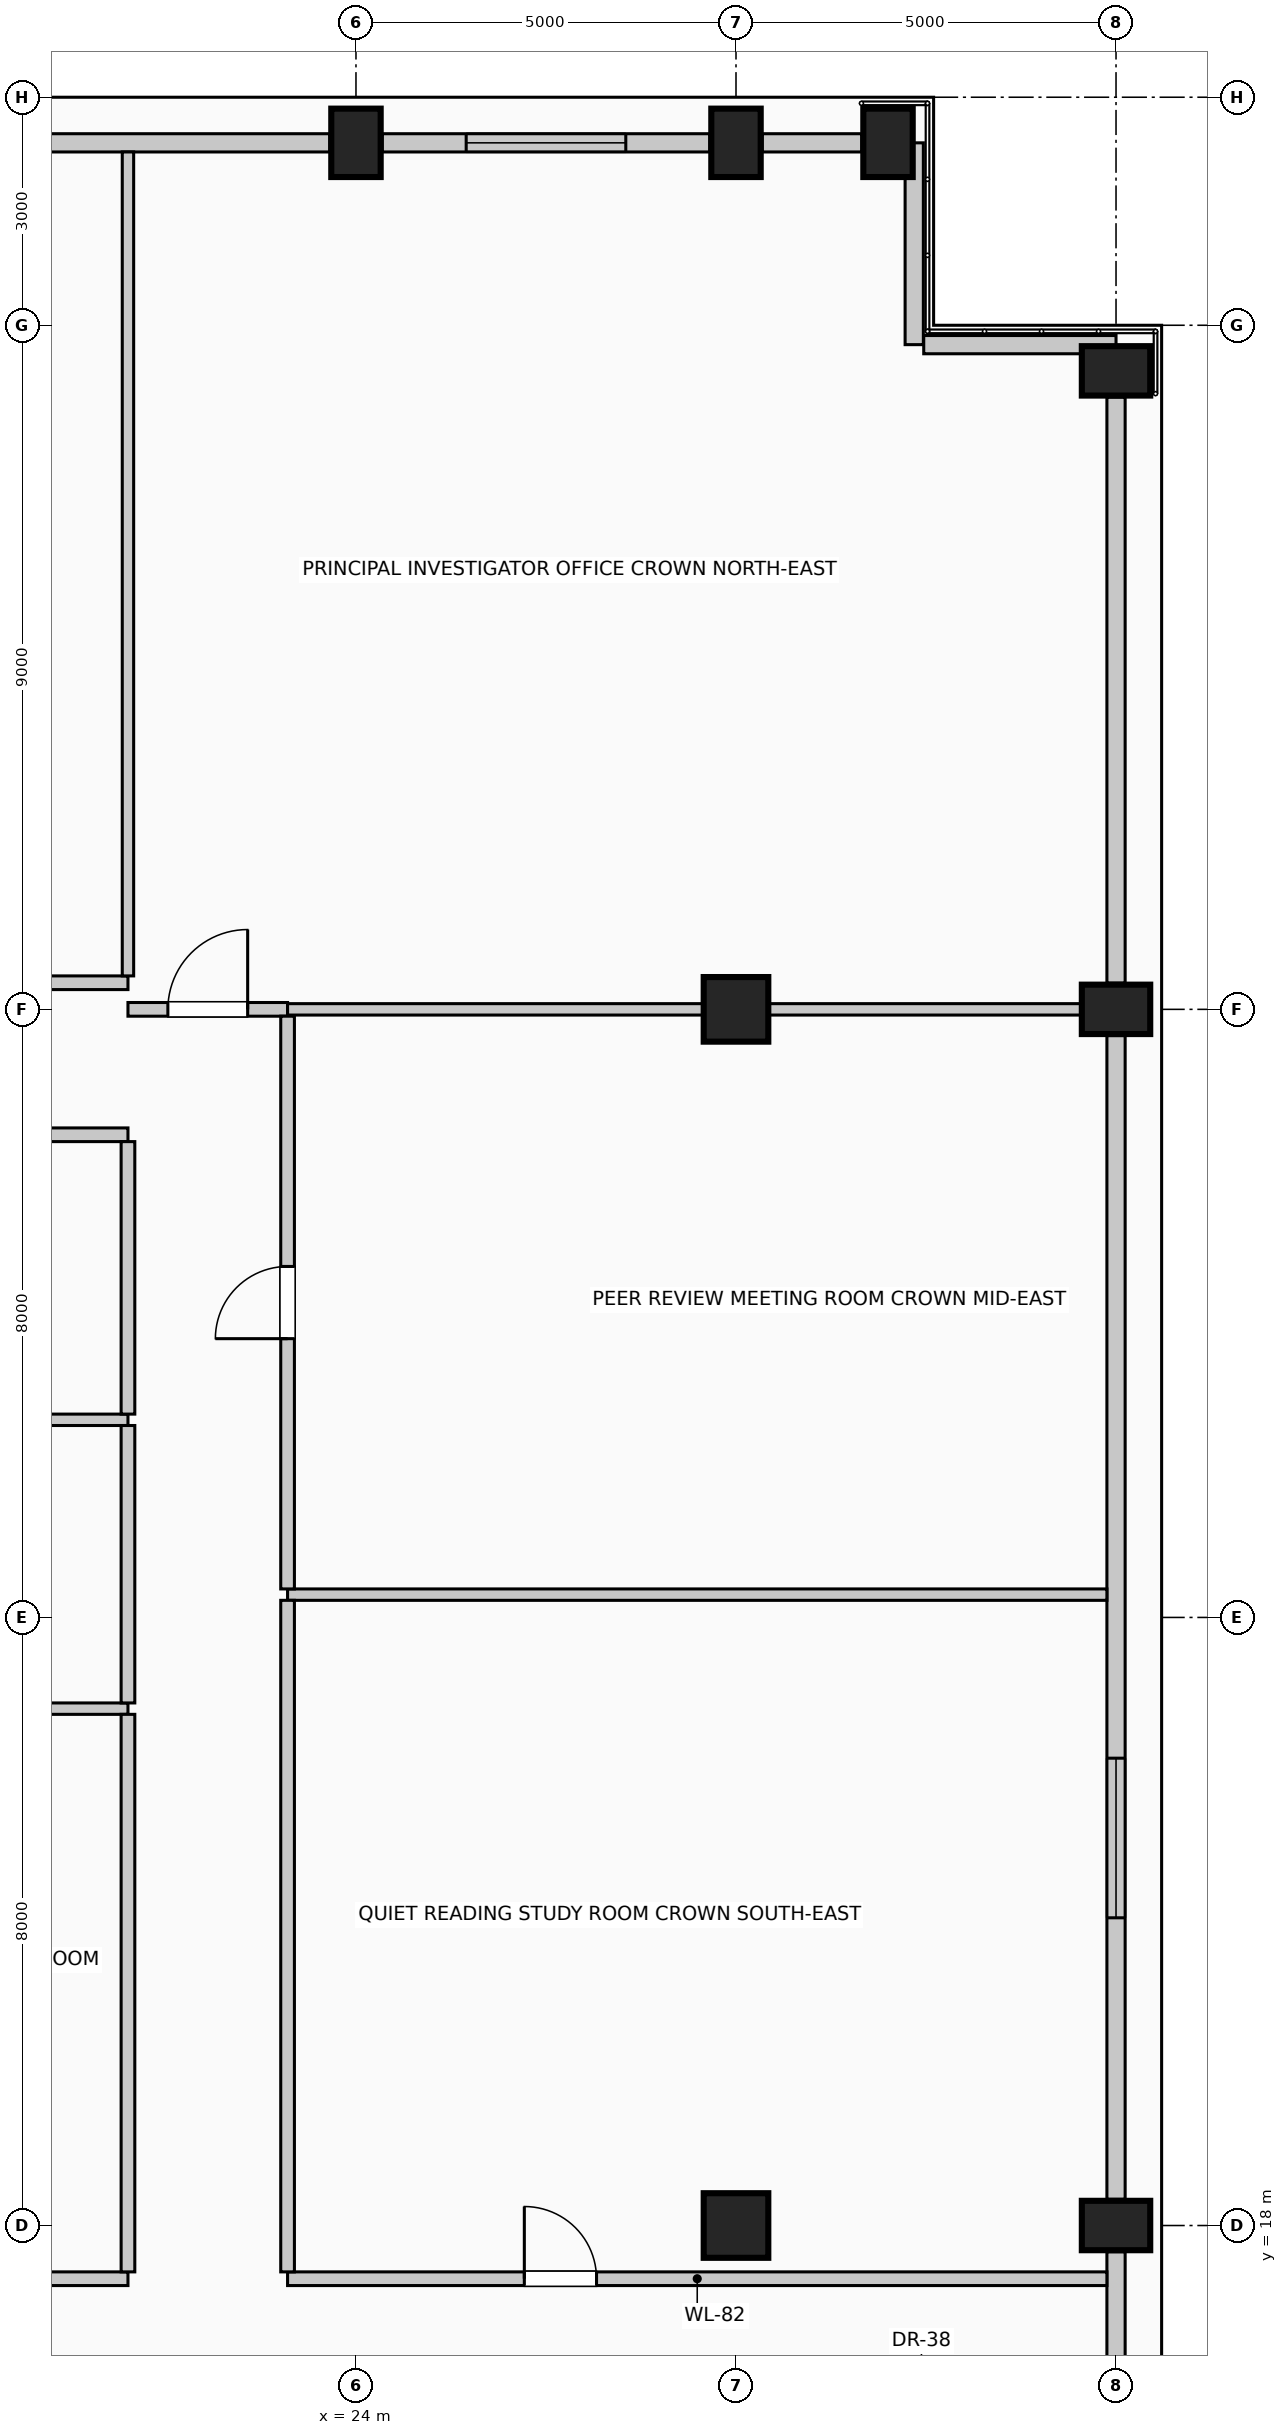
"""IFC4 building model, lengths in metres.
Left out: names, types, materials, properties, quantities, classifications, styles, units other than length and angle.
Written with IfcOpenShell. Run it as: python <this file> out.ifc"""

import sys

from ifc_helpers import new_model, si_unit, direction, frame, frame_2d, origin, origin_2d, place, context, subcontext, project, spatial, rectangle, circle, extrude, element, fill, save


model = new_model("IFC4")
c1 = context("Model", 3, precision=1e-05, world=origin(), true_north=direction((0.0, 1.0)))
c2 = subcontext(c1, "Body", "Model", "MODEL_VIEW")
j1 = project(units=[si_unit("LENGTHUNIT", "METRE"), si_unit("PLANEANGLEUNIT", "RADIAN")], contexts=[c1])
p1 = place(None, origin())
s1 = spatial("IfcSite", under=j1, at=p1, CompositionType="ELEMENT")
p2 = place(p1, origin())
s2 = spatial("IfcBuilding", under=s1, at=p2, CompositionType="ELEMENT")
p3 = place(p2, frame((0.0, 0.0, 309.0)))
s3 = spatial("IfcBuildingStorey", under=s2, at=p3, CompositionType="ELEMENT", Elevation=309.0)
for number, where, z_axis, x_axis in (
    (1, (24.0, 45.4, 0.0), (0.0, 0.0, 1.0), (1.0, 0.0, 0.0)),
    (2, (29.0, 45.4, 0.0), (0.0, 0.0, 1.0), (1.0, 0.0, 0.0)),
    (3, (31.0, 45.4, 0.0), (0.0, 0.0, 1.0), (1.0, 0.0, 0.0)),
    (4, (34.0, 18.0, 0.0), (0.0, 0.0, 1.0), (0.0, 1.0, 0.0)),
    (5, (34.0, 34.0, 0.0), (0.0, 0.0, 1.0), (0.0, 1.0, 0.0)),
    (6, (34.0, 42.4, 0.0), (0.0, 0.0, 1.0), (0.0, 1.0, 0.0)),
):
    element("IfcColumn", number, at=place(p3, frame(where, z_axis=z_axis, x_axis=x_axis)), inside=s3, PredefinedType="COLUMN", context=c2, shape_type="SweptSolid", body=[
        extrude(rectangle(XDim=0.65, YDim=0.9, at=origin_2d()), origin(), (0.0, 0.0, 1.0), 4.0),
    ])
for number, where, z_axis, x_axis in (
    (7, (29.0, 18.0, 0.0), (0.0, 0.0, 1.0), (1.0, 0.0, 0.0)),
    (8, (29.0, 34.0, 0.0), (0.0, 0.0, 1.0), (1.0, 0.0, 0.0)),
):
    element("IfcColumn", number, at=place(p3, frame(where, z_axis=z_axis, x_axis=x_axis)), inside=s3, PredefinedType="COLUMN", context=c2, shape_type="SweptSolid", body=[
        extrude(circle(Radius=0.425, at=origin_2d()), origin(), (0.0, 0.0, 1.0), 4.0),
    ])
p4 = place(p3, frame((16.745, 45.4, 0.0), z_axis=(0.0, 0.0, 1.0), x_axis=(1.0, 0.0, 0.0)))
e9 = element("IfcWall", 9, at=p4, inside=s3, PredefinedType="SOLIDWALL", context=c2, shape_type="SweptSolid", body=[
    extrude(rectangle(XDim=6.91, YDim=0.24, at=frame_2d((3.455, 0.0))), origin(), (0.0, 0.0, 1.0), 3.025),
])
p5 = place(p3, frame((24.345, 45.4, 0.0), z_axis=(0.0, 0.0, 1.0), x_axis=(1.0, 0.0, 0.0)))
e10 = element("IfcWall", 10, at=p5, inside=s3, PredefinedType="SOLIDWALL", context=c2, shape_type="SweptSolid", body=[
    extrude(rectangle(XDim=4.31, YDim=0.24, at=frame_2d((2.155, 0.0))), origin(), (0.0, 0.0, 1.0), 3.025),
])
p6 = place(p5, frame((1.105, 0.0, 0.35)))
e11 = element("IfcOpeningElement", 11, at=p6, cuts=e10, PredefinedType="OPENING", context=c2, shape_type="SweptSolid", body=[
    extrude(rectangle(XDim=2.1, YDim=2.2, at=frame_2d((1.05, 1.1))), frame((0.0, 0.13, 0.0), z_axis=(0.0, -1.0, 0.0), x_axis=(1.0, 0.0, 0.0)), (0.0, 0.0, 1.0), 0.26),
])
p7 = place(p3, frame((29.345, 45.4, 0.0), z_axis=(0.0, 0.0, 1.0), x_axis=(1.0, 0.0, 0.0)))
e12 = element("IfcWall", 12, at=p7, inside=s3, PredefinedType="SOLIDWALL", context=c2, shape_type="SweptSolid", body=[
    extrude(rectangle(XDim=1.31, YDim=0.24, at=frame_2d((0.655, 0.0))), origin(), (0.0, 0.0, 1.0), 3.025),
])
p8 = place(p3, frame((34.0, 17.655, 0.0), z_axis=(0.0, 0.0, 1.0), x_axis=(0.0, -1.0, 0.0)))
e13 = element("IfcWall", 13, at=p8, inside=s3, PredefinedType="SOLIDWALL", context=c2, shape_type="SweptSolid", body=[
    extrude(rectangle(XDim=13.71, YDim=0.24, at=frame_2d((6.855, 0.0))), origin(), (0.0, 0.0, 1.0), 3.025),
])
p9 = place(p8, frame((3.17, 0.0, 0.35)))
e14 = element("IfcOpeningElement", 14, at=p9, cuts=e13, PredefinedType="OPENING", context=c2, shape_type="SweptSolid", body=[
    extrude(rectangle(XDim=2.1, YDim=2.2, at=frame_2d((1.05, 1.1))), frame((0.0, 0.13, 0.0), z_axis=(0.0, -1.0, 0.0), x_axis=(1.0, 0.0, 0.0)), (0.0, 0.0, 1.0), 0.26),
])
p10 = place(p8, frame((8.44, 0.0, 0.35)))
e15 = element("IfcOpeningElement", 15, at=p10, cuts=e13, PredefinedType="OPENING", context=c2, shape_type="SweptSolid", body=[
    extrude(rectangle(XDim=2.1, YDim=2.2, at=frame_2d((1.05, 1.1))), frame((0.0, 0.13, 0.0), z_axis=(0.0, -1.0, 0.0), x_axis=(1.0, 0.0, 0.0)), (0.0, 0.0, 1.0), 0.26),
])
p11 = place(p3, frame((34.0, 33.655, 0.0), z_axis=(0.0, 0.0, 1.0), x_axis=(0.0, -1.0, 0.0)))
e16 = element("IfcWall", 16, at=p11, inside=s3, PredefinedType="SOLIDWALL", context=c2, shape_type="SweptSolid", body=[
    extrude(rectangle(XDim=15.31, YDim=0.24, at=frame_2d((7.655, 0.0))), origin(), (0.0, 0.0, 1.0), 3.025),
])
p12 = place(p11, frame((9.507, 0.0, 0.35)))
e17 = element("IfcOpeningElement", 17, at=p12, cuts=e16, PredefinedType="OPENING", context=c2, shape_type="SweptSolid", body=[
    extrude(rectangle(XDim=2.1, YDim=2.2, at=frame_2d((1.05, 1.1))), frame((0.0, 0.13, 0.0), z_axis=(0.0, -1.0, 0.0), x_axis=(1.0, 0.0, 0.0)), (0.0, 0.0, 1.0), 0.26),
])
p13 = place(p3, frame((34.0, 42.055, 0.0), z_axis=(0.0, 0.0, 1.0), x_axis=(0.0, -1.0, 0.0)))
e18 = element("IfcWall", 18, at=p13, inside=s3, PredefinedType="SOLIDWALL", context=c2, shape_type="SweptSolid", body=[
    extrude(rectangle(XDim=7.71, YDim=0.24, at=frame_2d((3.855, 0.0))), origin(), (0.0, 0.0, 1.0), 3.025),
])
p14 = place(p3, frame((31.345, 45.4, 0.0), z_axis=(0.0, 0.0, 1.0), x_axis=(0.0, -1.0, 0.0)))
e19 = element("IfcWall", 19, at=p14, inside=s3, PredefinedType="SOLIDWALL", context=c2, shape_type="SweptSolid", body=[
    extrude(rectangle(XDim=2.655, YDim=0.24, at=frame_2d((1.327, 0.0))), origin(), (0.0, 0.0, 1.0), 3.775),
])
p15 = place(p3, frame((31.47, 42.745, 0.0), z_axis=(0.0, 0.0, 1.0), x_axis=(1.0, 0.0, 0.0)))
e20 = element("IfcWall", 20, at=p15, inside=s3, PredefinedType="SOLIDWALL", context=c2, shape_type="SweptSolid", body=[
    extrude(rectangle(XDim=2.53, YDim=0.24, at=frame_2d((1.265, 0.0))), origin(), (0.0, 0.0, 1.0), 3.775),
])
p16 = place(p3, frame((15.85, 17.3, 0.0), z_axis=(0.0, 0.0, 1.0), x_axis=(1.0, 0.0, 0.0)))
e21 = element("IfcWall", 21, at=p16, inside=s3, PredefinedType="PARTITIONING", context=c2, shape_type="SweptSolid", body=[
    extrude(rectangle(XDim=5.15, YDim=0.18, at=frame_2d((2.575, 0.0))), origin(), (0.0, 0.0, 1.0), 3.775),
])
p17 = place(p16, frame((2.41, 0.0, 0.0)))
e22 = element("IfcOpeningElement", 22, at=p17, cuts=e21, PredefinedType="OPENING", context=c2, shape_type="SweptSolid", body=[
    extrude(rectangle(XDim=1.05, YDim=2.15, at=frame_2d((0.525, 1.075))), frame((0.0, 0.1, 0.0), z_axis=(0.0, -1.0, 0.0), x_axis=(1.0, 0.0, 0.0)), (0.0, 0.0, 1.0), 0.2),
])
p18 = place(p3, frame((23.1, 17.3, 0.0), z_axis=(0.0, 0.0, 1.0), x_axis=(1.0, 0.0, 0.0)))
e23 = element("IfcWall", 23, at=p18, inside=s3, PredefinedType="PARTITIONING", context=c2, shape_type="SweptSolid", body=[
    extrude(rectangle(XDim=10.78, YDim=0.18, at=frame_2d((5.39, 0.0))), origin(), (0.0, 0.0, 1.0), 3.775),
])
p19 = place(p18, frame((3.115, 0.0, 0.0)))
e24 = element("IfcOpeningElement", 24, at=p19, cuts=e23, PredefinedType="OPENING", context=c2, shape_type="SweptSolid", body=[
    extrude(rectangle(XDim=0.95, YDim=2.15, at=frame_2d((0.475, 1.075))), frame((0.0, 0.1, 0.0), z_axis=(0.0, -1.0, 0.0), x_axis=(1.0, 0.0, 0.0)), (0.0, 0.0, 1.0), 0.2),
])
p20 = place(p3, frame((15.85, 24.8, 0.0), z_axis=(0.0, 0.0, 1.0), x_axis=(1.0, 0.0, 0.0)))
e25 = element("IfcWall", 25, at=p20, inside=s3, PredefinedType="PARTITIONING", context=c2, shape_type="SweptSolid", body=[
    extrude(rectangle(XDim=5.15, YDim=0.15, at=frame_2d((2.575, 0.0))), origin(), (0.0, 0.0, 1.0), 3.775),
])
p21 = place(p3, frame((23.1, 26.3, 0.0), z_axis=(0.0, 0.0, 1.0), x_axis=(1.0, 0.0, 0.0)))
e26 = element("IfcWall", 26, at=p21, inside=s3, PredefinedType="PARTITIONING", context=c2, shape_type="SweptSolid", body=[
    extrude(rectangle(XDim=10.78, YDim=0.15, at=frame_2d((5.39, 0.0))), origin(), (0.0, 0.0, 1.0), 3.775),
])
p22 = place(p3, frame((12.2, 28.6, 0.0), z_axis=(0.0, 0.0, 1.0), x_axis=(1.0, 0.0, 0.0)))
e27 = element("IfcWall", 27, at=p22, inside=s3, PredefinedType="PARTITIONING", context=c2, shape_type="SweptSolid", body=[
    extrude(rectangle(XDim=8.8, YDim=0.15, at=frame_2d((4.4, 0.0))), origin(), (0.0, 0.0, 1.0), 3.775),
])
p23 = place(p3, frame((15.85, 32.35, 0.0), z_axis=(0.0, 0.0, 1.0), x_axis=(1.0, 0.0, 0.0)))
e28 = element("IfcWall", 28, at=p23, inside=s3, PredefinedType="PARTITIONING", context=c2, shape_type="SweptSolid", body=[
    extrude(rectangle(XDim=5.15, YDim=0.18, at=frame_2d((2.575, 0.0))), origin(), (0.0, 0.0, 1.0), 3.775),
])
p24 = place(p3, frame((21.0, 34.0, 0.0), z_axis=(0.0, 0.0, 1.0), x_axis=(1.0, 0.0, 0.0)))
e29 = element("IfcWall", 29, at=p24, inside=s3, PredefinedType="PARTITIONING", context=c2, shape_type="SweptSolid", body=[
    extrude(rectangle(XDim=2.1, YDim=0.18, at=frame_2d((1.05, 0.0))), origin(), (0.0, 0.0, 1.0), 3.27),
])
p25 = place(p24, frame((0.525, 0.0, 0.0)))
e30 = element("IfcOpeningElement", 30, at=p25, cuts=e29, PredefinedType="OPENING", context=c2, shape_type="SweptSolid", body=[
    extrude(rectangle(XDim=1.05, YDim=2.15, at=frame_2d((0.525, 1.075))), frame((0.0, 0.1, 0.0), z_axis=(0.0, -1.0, 0.0), x_axis=(1.0, 0.0, 0.0)), (0.0, 0.0, 1.0), 0.2),
])
p26 = place(p3, frame((23.1, 34.0, 0.0), z_axis=(0.0, 0.0, 1.0), x_axis=(1.0, 0.0, 0.0)))
e31 = element("IfcWall", 31, at=p26, inside=s3, PredefinedType="PARTITIONING", context=c2, shape_type="SweptSolid", body=[
    extrude(rectangle(XDim=5.475, YDim=0.15, at=frame_2d((2.737, 0.0))), origin(), (0.0, 0.0, 1.0), 3.27),
])
p27 = place(p3, frame((29.425, 34.0, 0.0), z_axis=(0.0, 0.0, 1.0), x_axis=(1.0, 0.0, 0.0)))
e32 = element("IfcWall", 32, at=p27, inside=s3, PredefinedType="PARTITIONING", context=c2, shape_type="SweptSolid", body=[
    extrude(rectangle(XDim=4.125, YDim=0.15, at=frame_2d((2.062, 0.0))), origin(), (0.0, 0.0, 1.0), 3.27),
])
p28 = place(p3, frame((17.0, 34.35, 0.0), z_axis=(0.0, 0.0, 1.0), x_axis=(1.0, 0.0, 0.0)))
e33 = element("IfcWall", 33, at=p28, inside=s3, PredefinedType="PARTITIONING", context=c2, shape_type="SweptSolid", body=[
    extrude(rectangle(XDim=4.0, YDim=0.18, at=frame_2d((2.0, 0.0))), origin(), (0.0, 0.0, 1.0), 3.775),
])
p29 = place(p28, frame((1.475, 0.0, 0.0)))
e34 = element("IfcOpeningElement", 34, at=p29, cuts=e33, PredefinedType="OPENING", context=c2, shape_type="SweptSolid", body=[
    extrude(rectangle(XDim=1.05, YDim=2.15, at=frame_2d((0.525, 1.075))), frame((0.0, 0.1, 0.0), z_axis=(0.0, -1.0, 0.0), x_axis=(1.0, 0.0, 0.0)), (0.0, 0.0, 1.0), 0.2),
])
p30 = place(p3, frame((21.0, 17.39, 0.0), z_axis=(0.0, 0.0, 1.0), x_axis=(0.0, 1.0, 0.0)))
e35 = element("IfcWall", 35, at=p30, inside=s3, PredefinedType="PARTITIONING", context=c2, shape_type="SweptSolid", body=[
    extrude(rectangle(XDim=7.335, YDim=0.18, at=frame_2d((3.667, 0.0))), origin(), (0.0, 0.0, 1.0), 3.775),
])
p31 = place(p3, frame((21.0, 24.875, 0.0), z_axis=(0.0, 0.0, 1.0), x_axis=(0.0, 1.0, 0.0)))
e36 = element("IfcWall", 36, at=p31, inside=s3, PredefinedType="PARTITIONING", context=c2, shape_type="SweptSolid", body=[
    extrude(rectangle(XDim=3.65, YDim=0.18, at=frame_2d((1.825, 0.0))), origin(), (0.0, 0.0, 1.0), 3.775),
])
p32 = place(p3, frame((21.0, 28.675, 0.0), z_axis=(0.0, 0.0, 1.0), x_axis=(0.0, 1.0, 0.0)))
e37 = element("IfcWall", 37, at=p32, inside=s3, PredefinedType="PARTITIONING", context=c2, shape_type="SweptSolid", body=[
    extrude(rectangle(XDim=3.585, YDim=0.18, at=frame_2d((1.792, 0.0))), origin(), (0.0, 0.0, 1.0), 3.775),
])
p33 = place(p3, frame((21.0, 34.44, 0.0), z_axis=(0.0, 0.0, 1.0), x_axis=(0.0, 1.0, 0.0)))
e38 = element("IfcWall", 38, at=p33, inside=s3, PredefinedType="PARTITIONING", context=c2, shape_type="SweptSolid", body=[
    extrude(rectangle(XDim=10.84, YDim=0.15, at=frame_2d((5.42, 0.0))), origin(), (0.0, 0.0, 1.0), 3.775),
])
p34 = place(p3, frame((23.1, 17.39, 0.0), z_axis=(0.0, 0.0, 1.0), x_axis=(0.0, 1.0, 0.0)))
e39 = element("IfcWall", 39, at=p34, inside=s3, PredefinedType="PARTITIONING", context=c2, shape_type="SweptSolid", body=[
    extrude(rectangle(XDim=8.835, YDim=0.18, at=frame_2d((4.417, 0.0))), origin(), (0.0, 0.0, 1.0), 3.775),
])
p35 = place(p3, frame((23.1, 26.375, 0.0), z_axis=(0.0, 0.0, 1.0), x_axis=(0.0, 1.0, 0.0)))
e40 = element("IfcWall", 40, at=p35, inside=s3, PredefinedType="PARTITIONING", context=c2, shape_type="SweptSolid", body=[
    extrude(rectangle(XDim=7.535, YDim=0.18, at=frame_2d((3.768, 0.0))), origin(), (0.0, 0.0, 1.0), 3.775),
])
p36 = place(p35, frame((3.292, 0.0, 0.0)))
e41 = element("IfcOpeningElement", 41, at=p36, cuts=e40, PredefinedType="OPENING", context=c2, shape_type="SweptSolid", body=[
    extrude(rectangle(XDim=0.95, YDim=2.15, at=frame_2d((0.475, 1.075))), frame((0.0, 0.1, 0.0), z_axis=(0.0, -1.0, 0.0), x_axis=(1.0, 0.0, 0.0)), (0.0, 0.0, 1.0), 0.2),
])
p37 = place(p6, origin())
e42 = element("IfcWindow", 42, at=p37, inside=s3, PartitioningType="SINGLE_PANEL", PredefinedType="WINDOW", context=c2, shape_type="SweptSolid", body=[
    extrude(rectangle(XDim=2.1, YDim=2.2, at=frame_2d((1.05, 1.1))), frame((0.0, 0.03, 0.0), z_axis=(0.0, -1.0, 0.0), x_axis=(1.0, 0.0, 0.0)), (0.0, 0.0, 1.0), 0.06),
])
fill(e11, e42)
p38 = place(p12, origin())
e43 = element("IfcWindow", 43, at=p38, inside=s3, PartitioningType="SINGLE_PANEL", PredefinedType="WINDOW", context=c2, shape_type="SweptSolid", body=[
    extrude(rectangle(XDim=2.1, YDim=2.2, at=frame_2d((1.05, 1.1))), frame((0.0, 0.03, 0.0), z_axis=(0.0, -1.0, 0.0), x_axis=(1.0, 0.0, 0.0)), (0.0, 0.0, 1.0), 0.06),
])
fill(e17, e43)
p39 = place(p19, origin())
e44 = element("IfcDoor", 44, at=p39, inside=s3, OperationType="SINGLE_SWING_LEFT", PredefinedType="DOOR", context=c2, shape_type="SweptSolid", body=[
    extrude(rectangle(XDim=0.95, YDim=2.15, at=frame_2d((0.475, 1.075))), frame((0.0, 0.025, 0.0), z_axis=(0.0, -1.0, 0.0), x_axis=(1.0, 0.0, 0.0)), (0.0, 0.0, 1.0), 0.05),
])
fill(e24, e44)
p40 = place(p25, origin())
e45 = element("IfcDoor", 45, at=p40, inside=s3, OperationType="SINGLE_SWING_RIGHT", PredefinedType="DOOR", context=c2, shape_type="SweptSolid", body=[
    extrude(rectangle(XDim=1.05, YDim=2.15, at=frame_2d((0.525, 1.075))), frame((0.0, 0.025, 0.0), z_axis=(0.0, -1.0, 0.0), x_axis=(1.0, 0.0, 0.0)), (0.0, 0.0, 1.0), 0.05),
])
fill(e30, e45)
p41 = place(p36, origin())
e46 = element("IfcDoor", 46, at=p41, inside=s3, OperationType="SINGLE_SWING_LEFT", PredefinedType="DOOR", context=c2, shape_type="SweptSolid", body=[
    extrude(rectangle(XDim=0.95, YDim=2.15, at=frame_2d((0.475, 1.075))), frame((0.0, 0.025, 0.0), z_axis=(0.0, -1.0, 0.0), x_axis=(1.0, 0.0, 0.0)), (0.0, 0.0, 1.0), 0.05),
])
fill(e41, e46)
save(model, sys.argv[1])
